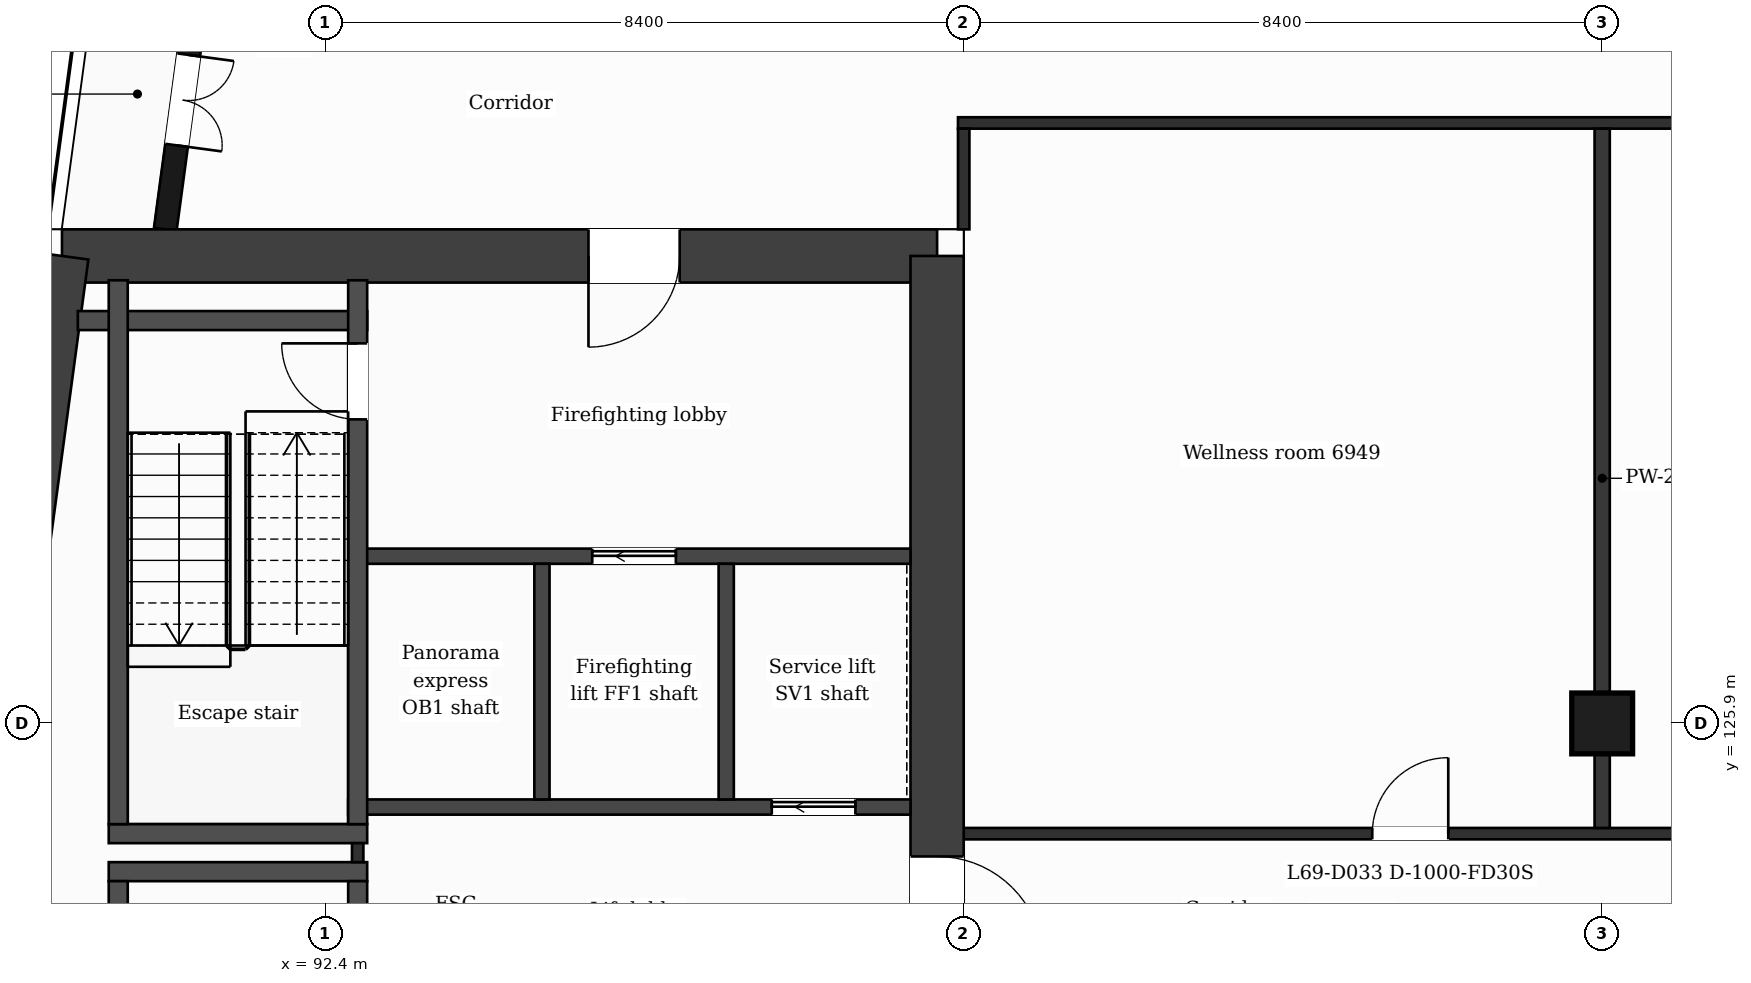
"""IFC4 building model, lengths in metres.
Left out: names, types, materials, properties, quantities, classifications, styles, units other than length and angle.
Written with IfcOpenShell. Run it as: python <this file> out.ifc"""

import sys

from ifc_helpers import new_model, si_unit, direction, frame, frame_2d, origin, origin_2d, place, context, subcontext, project, spatial, rectangle, extrude, element, fill, save


model = new_model("IFC4")
c1 = context("Model", 3, precision=1e-05, world=origin(), true_north=direction((0.0, 1.0)))
c2 = subcontext(c1, "Body", "Model", "MODEL_VIEW")
j1 = project(units=[si_unit("LENGTHUNIT", "METRE"), si_unit("PLANEANGLEUNIT", "RADIAN")], contexts=[c1])
p1 = place(None, origin())
s1 = spatial("IfcSite", under=j1, at=p1, CompositionType="ELEMENT")
p2 = place(p1, origin())
s2 = spatial("IfcBuilding", under=s1, at=p2, CompositionType="ELEMENT")
p3 = place(p2, frame((0.0, 0.0, 284.9)))
s3 = spatial("IfcBuildingStorey", under=s2, at=p3, CompositionType="ELEMENT", Elevation=284.9)
p4 = place(p3, frame((88.937, 132.05, 0.0), z_axis=(0.0, 0.0, 1.0), x_axis=(1.0, 0.0, 0.0)))
e1 = element("IfcWall", 1, at=p4, inside=s3, PredefinedType="SHEAR", context=c2, shape_type="SweptSolid", body=[
    extrude(rectangle(XDim=11.513, YDim=0.7, at=frame_2d((5.757, 0.0))), origin(), (0.0, 0.0, 1.0), 3.7),
])
p5 = place(p4, frame((6.927, 0.0, 0.0)))
e2 = element("IfcOpeningElement", 2, at=p5, cuts=e1, PredefinedType="OPENING", context=c2, shape_type="SweptSolid", body=[
    extrude(rectangle(XDim=1.2, YDim=2.1, at=frame_2d((0.6, 1.05))), frame((0.0, 0.36, 0.0), z_axis=(0.0, -1.0, 0.0), x_axis=(1.0, 0.0, 0.0)), (0.0, 0.0, 1.0), 0.72),
])
p6 = place(p3, frame((100.45, 132.05, 0.0), z_axis=(0.0, 0.0, 1.0), x_axis=(0.0, -1.0, 0.0)))
e3 = element("IfcWall", 3, at=p6, inside=s3, PredefinedType="SHEAR", context=c2, shape_type="SweptSolid", body=[
    extrude(rectangle(XDim=15.7, YDim=0.7, at=frame_2d((7.85, 0.0))), origin(), (0.0, 0.0, 1.0), 3.7),
])
p7 = place(p6, frame((7.9, 0.0, 0.0)))
e4 = element("IfcOpeningElement", 4, at=p7, cuts=e3, PredefinedType="OPENING", context=c2, shape_type="SweptSolid", body=[
    extrude(rectangle(XDim=1.4, YDim=2.1, at=frame_2d((0.7, 1.05))), frame((0.0, 0.36, 0.0), z_axis=(0.0, -1.0, 0.0), x_axis=(1.0, 0.0, 0.0)), (0.0, 0.0, 1.0), 0.72),
])
p8 = place(p3, frame((86.823, 116.35, 0.0), z_axis=(0.0, 0.0, 1.0), x_axis=(0.133416378607, 0.99106007382, 0.0)))
e5 = element("IfcWall", 5, at=p8, inside=s3, PredefinedType="SHEAR", context=c2, shape_type="SweptSolid", body=[
    extrude(rectangle(XDim=15.842, YDim=0.7, at=frame_2d((7.921, 0.0))), origin(), (0.0, 0.0, 1.0), 3.7),
])
p9 = place(p3, frame((109.2, 125.9, 0.0), z_axis=(0.0, 0.0, 1.0), x_axis=(1.0, 0.0, 0.0)))
e6 = element("IfcColumn", 6, at=p9, inside=s3, PredefinedType="COLUMN", context=c2, shape_type="SweptSolid", body=[
    extrude(rectangle(XDim=0.8, YDim=0.8, at=origin_2d()), origin(), (0.0, 0.0, 1.0), 3.7),
])
p10 = place(p3, frame((91.177, 138.95, 0.0), z_axis=(0.0, 0.0, 1.0), x_axis=(-0.133426664613, -0.991058689065, 0.0)))
e7 = element("IfcWall", 7, at=p10, inside=s3, PredefinedType="SOLIDWALL", context=c2, shape_type="SweptSolid", body=[
    extrude(rectangle(XDim=6.609, YDim=0.3, at=frame_2d((3.305, 0.0))), origin(), (0.0, 0.0, 1.0), 3.38),
])
p11 = place(p10, frame((1.039, 0.0, 0.9)))
e8 = element("IfcOpeningElement", 8, at=p11, cuts=e7, PredefinedType="OPENING", context=c2, shape_type="SweptSolid", body=[
    extrude(rectangle(XDim=1.2, YDim=2.1, at=frame_2d((0.6, 1.05))), frame((0.0, 0.16, 0.0), z_axis=(0.0, -1.0, 0.0), x_axis=(1.0, 0.0, 0.0)), (0.0, 0.0, 1.0), 0.32),
])
p12 = place(p10, frame((4.294, 0.0, 0.0)))
e9 = element("IfcOpeningElement", 9, at=p12, cuts=e7, PredefinedType="OPENING", context=c2, shape_type="SweptSolid", body=[
    extrude(rectangle(XDim=1.2, YDim=2.4, at=frame_2d((0.6, 1.2))), frame((0.0, 0.16, 0.0), z_axis=(0.0, -1.0, 0.0), x_axis=(1.0, 0.0, 0.0)), (0.0, 0.0, 1.0), 0.32),
])
for number, where, z_axis, x_axis in (
    (10, (89.552, 123.95, 0.0), (0.0, 0.0, 1.0), (1.0, 0.0, 0.0)),
    (11, (89.552, 124.45, 0.0), (0.0, 0.0, 1.0), (1.0, 0.0, 0.0)),
):
    element("IfcWall", number, at=place(p3, frame(where, z_axis=z_axis, x_axis=x_axis)), inside=s3, PredefinedType="PARTITIONING", context=c2, shape_type="SweptSolid", body=[
        extrude(rectangle(XDim=3.4, YDim=0.25, at=frame_2d((1.7, 0.0))), origin(), (0.0, 0.0, 1.0), 3.38),
    ])
p13 = place(p3, frame((100.8, 124.45, 0.0), z_axis=(0.0, 0.0, 1.0), x_axis=(1.0, 0.0, 0.0)))
e12 = element("IfcWall", 12, at=p13, inside=s3, PredefinedType="PARTITIONING", context=c2, shape_type="SweptSolid", body=[
    extrude(rectangle(XDim=25.2, YDim=0.15, at=frame_2d((12.6, 0.0))), origin(), (0.0, 0.0, 1.0), 3.38),
])
p14 = place(p13, frame((21.075, 0.0, 0.0)))
e13 = element("IfcOpeningElement", 13, at=p14, cuts=e12, PredefinedType="OPENING", context=c2, shape_type="SweptSolid", body=[
    extrude(rectangle(XDim=1.0, YDim=2.1, at=frame_2d((0.5, 1.05))), frame((0.0, 0.085, 0.0), z_axis=(0.0, -1.0, 0.0), x_axis=(1.0, 0.0, 0.0)), (0.0, 0.0, 1.0), 0.17),
])
p15 = place(p13, frame((5.375, 0.0, 0.0)))
e14 = element("IfcOpeningElement", 14, at=p15, cuts=e12, PredefinedType="OPENING", context=c2, shape_type="SweptSolid", body=[
    extrude(rectangle(XDim=1.0, YDim=2.1, at=frame_2d((0.5, 1.05))), frame((0.0, 0.085, 0.0), z_axis=(0.0, -1.0, 0.0), x_axis=(1.0, 0.0, 0.0)), (0.0, 0.0, 1.0), 0.17),
])
p16 = place(p13, frame((12.1, 0.0, 0.0)))
e15 = element("IfcOpeningElement", 15, at=p16, cuts=e12, PredefinedType="OPENING", context=c2, shape_type="SweptSolid", body=[
    extrude(rectangle(XDim=1.0, YDim=2.1, at=frame_2d((0.5, 1.05))), frame((0.0, 0.085, 0.0), z_axis=(0.0, -1.0, 0.0), x_axis=(1.0, 0.0, 0.0)), (0.0, 0.0, 1.0), 0.17),
])
p17 = place(p13, frame((17.93, 0.0, 0.0)))
e16 = element("IfcOpeningElement", 16, at=p17, cuts=e12, PredefinedType="OPENING", context=c2, shape_type="SweptSolid", body=[
    extrude(rectangle(XDim=1.0, YDim=2.1, at=frame_2d((0.5, 1.05))), frame((0.0, 0.085, 0.0), z_axis=(0.0, -1.0, 0.0), x_axis=(1.0, 0.0, 0.0)), (0.0, 0.0, 1.0), 0.17),
])
p18 = place(p3, frame((92.702, 124.8, 0.0), z_axis=(0.0, 0.0, 1.0), x_axis=(1.0, 0.0, 0.0)))
e17 = element("IfcWall", 17, at=p18, inside=s3, PredefinedType="PARTITIONING", context=c2, shape_type="SweptSolid", body=[
    extrude(rectangle(XDim=7.398, YDim=0.2, at=frame_2d((3.699, 0.0))), origin(), (0.0, 0.0, 1.0), 3.38),
])
p19 = place(p18, frame((5.573, 0.0, 0.0)))
e18 = element("IfcOpeningElement", 18, at=p19, cuts=e17, PredefinedType="OPENING", context=c2, shape_type="SweptSolid", body=[
    extrude(rectangle(XDim=1.1, YDim=2.1, at=frame_2d((0.55, 1.05))), frame((0.0, 0.11, 0.0), z_axis=(0.0, -1.0, 0.0), x_axis=(1.0, 0.0, 0.0)), (0.0, 0.0, 1.0), 0.22),
])
p20 = place(p3, frame((92.827, 128.1, 0.0), z_axis=(0.0, 0.0, 1.0), x_axis=(1.0, 0.0, 0.0)))
e19 = element("IfcWall", 19, at=p20, inside=s3, PredefinedType="PARTITIONING", context=c2, shape_type="SweptSolid", body=[
    extrude(rectangle(XDim=7.273, YDim=0.2, at=frame_2d((3.637, 0.0))), origin(), (0.0, 0.0, 1.0), 3.38),
])
p21 = place(p20, frame((3.086, 0.0, 0.0)))
e20 = element("IfcOpeningElement", 20, at=p21, cuts=e19, PredefinedType="OPENING", context=c2, shape_type="SweptSolid", body=[
    extrude(rectangle(XDim=1.1, YDim=2.1, at=frame_2d((0.55, 1.05))), frame((0.0, 0.11, 0.0), z_axis=(0.0, -1.0, 0.0), x_axis=(1.0, 0.0, 0.0)), (0.0, 0.0, 1.0), 0.22),
])
p22 = place(p3, frame((89.146, 131.2, 0.0), z_axis=(0.0, 0.0, 1.0), x_axis=(1.0, 0.0, 0.0)))
e21 = element("IfcWall", 21, at=p22, inside=s3, PredefinedType="PARTITIONING", context=c2, shape_type="SweptSolid", body=[
    extrude(rectangle(XDim=3.806, YDim=0.25, at=frame_2d((1.903, 0.0))), origin(), (0.0, 0.0, 1.0), 3.38),
])
p23 = place(p3, frame((100.725, 133.8, 0.0), z_axis=(0.0, 0.0, 1.0), x_axis=(1.0, 0.0, 0.0)))
e22 = element("IfcWall", 22, at=p23, inside=s3, PredefinedType="PARTITIONING", context=c2, shape_type="SweptSolid", body=[
    extrude(rectangle(XDim=25.35, YDim=0.15, at=frame_2d((12.675, 0.0))), origin(), (0.0, 0.0, 1.0), 3.38),
])
for number, where, z_axis, x_axis in (
    (23, (89.677, 116.67, 0.0), (0.0, 0.0, 1.0), (0.0, 1.0, 0.0)),
    (24, (89.677, 124.575, 0.0), (0.0, 0.0, 1.0), (0.0, 1.0, 0.0)),
):
    element("IfcWall", number, at=place(p3, frame(where, z_axis=z_axis, x_axis=x_axis)), inside=s3, PredefinedType="PARTITIONING", context=c2, shape_type="SweptSolid", body=[
        extrude(rectangle(XDim=7.155, YDim=0.25, at=frame_2d((3.578, 0.0))), origin(), (0.0, 0.0, 1.0), 3.38),
    ])
p24 = place(p3, frame((92.827, 124.075, 0.0), z_axis=(0.0, 0.0, 1.0), x_axis=(0.0, 1.0, 0.0)))
e25 = element("IfcWall", 25, at=p24, inside=s3, PredefinedType="PARTITIONING", context=c2, shape_type="SweptSolid", body=[
    extrude(rectangle(XDim=0.25, YDim=0.15, at=frame_2d((0.125, 0.0))), origin(), (0.0, 0.0, 1.0), 3.38),
])
p25 = place(p3, frame((92.827, 116.67, 0.0), z_axis=(0.0, 0.0, 1.0), x_axis=(0.0, 1.0, 0.0)))
e26 = element("IfcWall", 26, at=p25, inside=s3, PredefinedType="PARTITIONING", context=c2, shape_type="SweptSolid", body=[
    extrude(rectangle(XDim=7.155, YDim=0.25, at=frame_2d((3.578, 0.0))), origin(), (0.0, 0.0, 1.0), 3.38),
])
p26 = place(p25, frame((5.855, 0.0, 0.0)))
e27 = element("IfcOpeningElement", 27, at=p26, cuts=e26, PredefinedType="OPENING", context=c2, shape_type="SweptSolid", body=[
    extrude(rectangle(XDim=0.95, YDim=2.1, at=frame_2d((0.475, 1.05))), frame((0.0, 0.135, 0.0), z_axis=(0.0, -1.0, 0.0), x_axis=(1.0, 0.0, 0.0)), (0.0, 0.0, 1.0), 0.27),
])
p27 = place(p3, frame((92.827, 124.575, 0.0), z_axis=(0.0, 0.0, 1.0), x_axis=(0.0, 1.0, 0.0)))
e28 = element("IfcWall", 28, at=p27, inside=s3, PredefinedType="PARTITIONING", context=c2, shape_type="SweptSolid", body=[
    extrude(rectangle(XDim=7.155, YDim=0.25, at=frame_2d((3.578, 0.0))), origin(), (0.0, 0.0, 1.0), 3.38),
])
p28 = place(p27, frame((5.325, 0.0, 0.0)))
e29 = element("IfcOpeningElement", 29, at=p28, cuts=e28, PredefinedType="OPENING", context=c2, shape_type="SweptSolid", body=[
    extrude(rectangle(XDim=1.0, YDim=2.1, at=frame_2d((0.5, 1.05))), frame((0.0, 0.135, 0.0), z_axis=(0.0, -1.0, 0.0), x_axis=(1.0, 0.0, 0.0)), (0.0, 0.0, 1.0), 0.27),
])
for number, where, z_axis, x_axis in (
    (30, (95.251, 124.9, 0.0), (0.0, 0.0, 1.0), (0.0, 1.0, 0.0)),
    (31, (97.676, 124.9, 0.0), (0.0, 0.0, 1.0), (0.0, 1.0, 0.0)),
):
    element("IfcWall", number, at=place(p3, frame(where, z_axis=z_axis, x_axis=x_axis)), inside=s3, PredefinedType="PARTITIONING", context=c2, shape_type="SweptSolid", body=[
        extrude(rectangle(XDim=3.1, YDim=0.2, at=frame_2d((1.55, 0.0))), origin(), (0.0, 0.0, 1.0), 3.38),
    ])
p29 = place(p3, frame((100.8, 132.4, 0.0), z_axis=(0.0, 0.0, 1.0), x_axis=(0.0, 1.0, 0.0)))
e32 = element("IfcWall", 32, at=p29, inside=s3, PredefinedType="PARTITIONING", context=c2, shape_type="SweptSolid", body=[
    extrude(rectangle(XDim=1.325, YDim=0.15, at=frame_2d((0.663, 0.0))), origin(), (0.0, 0.0, 1.0), 3.38),
])
p30 = place(p3, frame((109.2, 124.525, 0.0), z_axis=(0.0, 0.0, 1.0), x_axis=(0.0, 1.0, 0.0)))
e33 = element("IfcWall", 33, at=p30, inside=s3, PredefinedType="PARTITIONING", context=c2, shape_type="SweptSolid", body=[
    extrude(rectangle(XDim=9.2, YDim=0.2, at=frame_2d((4.6, 0.0))), origin(), (0.0, 0.0, 1.0), 3.38),
])
p31 = place(p12, origin())
e34 = element("IfcDoor", 34, at=p31, inside=s3, OperationType="DOUBLE_DOOR_SINGLE_SWING", PredefinedType="DOOR", context=c2, shape_type="SweptSolid", body=[
    extrude(rectangle(XDim=1.2, YDim=2.4, at=frame_2d((0.6, 1.2))), frame((0.0, 0.025, 0.0), z_axis=(0.0, -1.0, 0.0), x_axis=(1.0, 0.0, 0.0)), (0.0, 0.0, 1.0), 0.05),
])
fill(e9, e34)
p32 = place(p21, origin())
e35 = element("IfcDoor", 35, at=p32, inside=s3, OperationType="SLIDING_TO_LEFT", PredefinedType="DOOR", context=c2, shape_type="SweptSolid", body=[
    extrude(rectangle(XDim=1.1, YDim=2.1, at=frame_2d((0.55, 1.05))), frame((0.0, 0.025, 0.0), z_axis=(0.0, -1.0, 0.0), x_axis=(1.0, 0.0, 0.0)), (0.0, 0.0, 1.0), 0.05),
])
fill(e20, e35)
p33 = place(p19, origin())
e36 = element("IfcDoor", 36, at=p33, inside=s3, OperationType="SLIDING_TO_LEFT", PredefinedType="DOOR", context=c2, shape_type="SweptSolid", body=[
    extrude(rectangle(XDim=1.1, YDim=2.1, at=frame_2d((0.55, 1.05))), frame((0.0, 0.025, 0.0), z_axis=(0.0, -1.0, 0.0), x_axis=(1.0, 0.0, 0.0)), (0.0, 0.0, 1.0), 0.05),
])
fill(e18, e36)
p34 = place(p28, origin())
e37 = element("IfcDoor", 37, at=p34, inside=s3, OperationType="SINGLE_SWING_RIGHT", PredefinedType="DOOR", context=c2, shape_type="SweptSolid", body=[
    extrude(rectangle(XDim=1.0, YDim=2.1, at=frame_2d((0.5, 1.05))), frame((0.0, 0.025, 0.0), z_axis=(0.0, -1.0, 0.0), x_axis=(1.0, 0.0, 0.0)), (0.0, 0.0, 1.0), 0.05),
])
fill(e29, e37)
p35 = place(p15, origin())
e38 = element("IfcDoor", 38, at=p35, inside=s3, OperationType="SINGLE_SWING_RIGHT", PredefinedType="DOOR", context=c2, shape_type="SweptSolid", body=[
    extrude(rectangle(XDim=1.0, YDim=2.1, at=frame_2d((0.5, 1.05))), frame((0.0, 0.025, 0.0), z_axis=(0.0, -1.0, 0.0), x_axis=(1.0, 0.0, 0.0)), (0.0, 0.0, 1.0), 0.05),
])
fill(e14, e38)
p36 = place(p5, origin())
e39 = element("IfcDoor", 39, at=p36, inside=s3, OperationType="SINGLE_SWING_LEFT", PredefinedType="DOOR", context=c2, shape_type="SweptSolid", body=[
    extrude(rectangle(XDim=1.2, YDim=2.1, at=frame_2d((0.6, 1.05))), frame((0.0, 0.025, 0.0), z_axis=(0.0, -1.0, 0.0), x_axis=(1.0, 0.0, 0.0)), (0.0, 0.0, 1.0), 0.05),
])
fill(e2, e39)
p37 = place(p7, origin())
e40 = element("IfcDoor", 40, at=p37, inside=s3, OperationType="SINGLE_SWING_RIGHT", PredefinedType="DOOR", context=c2, shape_type="SweptSolid", body=[
    extrude(rectangle(XDim=1.4, YDim=2.1, at=frame_2d((0.7, 1.05))), frame((0.0, 0.025, 0.0), z_axis=(0.0, -1.0, 0.0), x_axis=(1.0, 0.0, 0.0)), (0.0, 0.0, 1.0), 0.05),
])
fill(e4, e40)
save(model, sys.argv[1])
